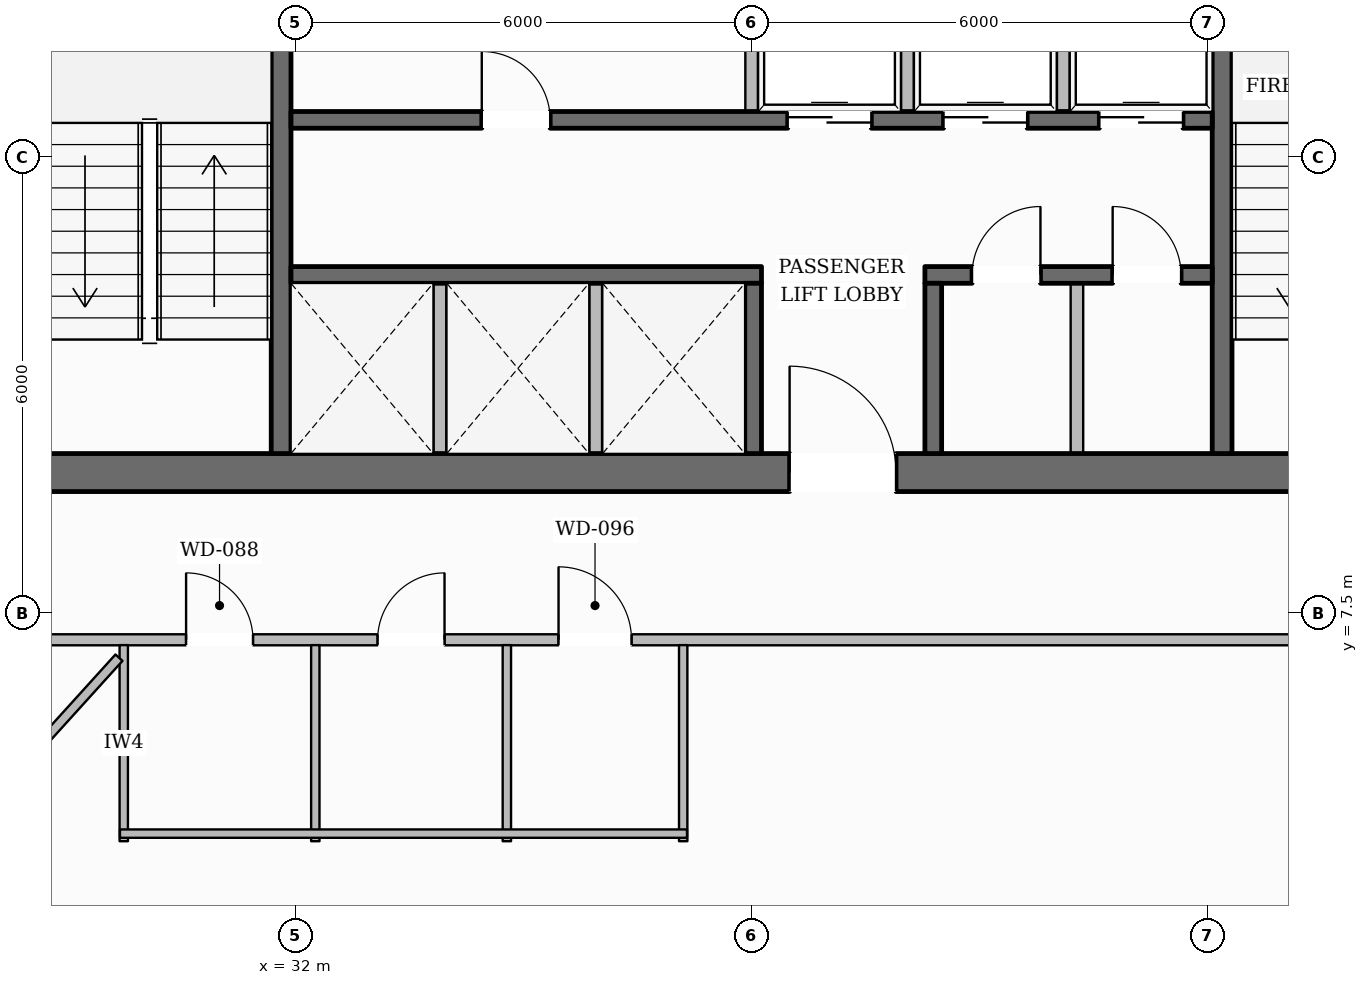
"""IFC4 building model, lengths in metres.
Left out: names, types, materials, properties, quantities, classifications, styles, units other than length and angle.
Written with IfcOpenShell. Run it as: python <this file> out.ifc"""

import sys

from ifc_helpers import new_model, si_unit, direction, frame, frame_2d, origin, place, context, subcontext, project, spatial, rectangle, extrude, element, fill, save


model = new_model("IFC4")
c1 = context("Model", 3, precision=1e-05, world=origin(), true_north=direction((0.0, 1.0)))
c2 = subcontext(c1, "Body", "Model", "MODEL_VIEW")
j1 = project(units=[si_unit("LENGTHUNIT", "METRE"), si_unit("PLANEANGLEUNIT", "RADIAN")], contexts=[c1])
p1 = place(None, origin())
s1 = spatial("IfcSite", under=j1, at=p1, CompositionType="ELEMENT")
p2 = place(p1, origin())
s2 = spatial("IfcBuilding", under=s1, at=p2, CompositionType="ELEMENT")
p3 = place(p2, frame((0.0, 0.0, 127.85)))
s3 = spatial("IfcBuildingStorey", under=s2, at=p3, CompositionType="ELEMENT", Elevation=127.85)
p4 = place(p3, frame((27.98, 9.35, 0.0), z_axis=(0.0, 0.0, 1.0), x_axis=(1.0, 0.0, 0.0)))
e1 = element("IfcWall", 1, at=p4, inside=s3, PredefinedType="SOLIDWALL", context=c2, shape_type="SweptSolid", body=[
    extrude(rectangle(XDim=20.04, YDim=0.5, at=frame_2d((10.02, 0.0))), origin(), (0.0, 0.0, 1.0), 3.6),
])
p5 = place(p4, frame((10.52, 0.0, 0.0)))
e2 = element("IfcOpeningElement", 2, at=p5, cuts=e1, PredefinedType="OPENING", context=c2, shape_type="SweptSolid", body=[
    extrude(rectangle(XDim=1.4, YDim=2.2, at=frame_2d((0.7, 1.1))), frame((0.0, 0.26, 0.0), z_axis=(0.0, -1.0, 0.0), x_axis=(1.0, 0.0, 0.0)), (0.0, 0.0, 1.0), 0.52),
])
p6 = place(p3, frame((31.81, 9.6, 0.0), z_axis=(0.0, 0.0, 1.0), x_axis=(0.0, 1.0, 0.0)))
e3 = element("IfcWall", 3, at=p6, inside=s3, PredefinedType="SHEAR", context=c2, shape_type="SweptSolid", body=[
    extrude(rectangle(XDim=13.0, YDim=0.26, at=frame_2d((6.5, 0.0))), origin(), (0.0, 0.0, 1.0), 3.6),
])
p7 = place(p6, frame((10.925, 0.0, 0.0)))
e4 = element("IfcOpeningElement", 4, at=p7, cuts=e3, PredefinedType="OPENING", context=c2, shape_type="SweptSolid", body=[
    extrude(rectangle(XDim=1.25, YDim=2.25, at=frame_2d((0.625, 1.125))), frame((0.0, 0.14, 0.0), z_axis=(0.0, -1.0, 0.0), x_axis=(1.0, 0.0, 0.0)), (0.0, 0.0, 1.0), 0.28),
])
p8 = place(p3, frame((44.19, 9.6, 0.0), z_axis=(0.0, 0.0, 1.0), x_axis=(0.0, 1.0, 0.0)))
e5 = element("IfcWall", 5, at=p8, inside=s3, PredefinedType="SHEAR", context=c2, shape_type="SweptSolid", body=[
    extrude(rectangle(XDim=13.0, YDim=0.26, at=frame_2d((6.5, 0.0))), origin(), (0.0, 0.0, 1.0), 3.6),
])
p9 = place(p8, frame((10.925, 0.0, 0.0)))
e6 = element("IfcOpeningElement", 6, at=p9, cuts=e5, PredefinedType="OPENING", context=c2, shape_type="SweptSolid", body=[
    extrude(rectangle(XDim=1.25, YDim=2.25, at=frame_2d((0.625, 1.125))), frame((0.0, 0.14, 0.0), z_axis=(0.0, -1.0, 0.0), x_axis=(1.0, 0.0, 0.0)), (0.0, 0.0, 1.0), 0.28),
])
p10 = place(p3, frame((31.94, 13.99, 0.0), z_axis=(0.0, 0.0, 1.0), x_axis=(1.0, 0.0, 0.0)))
e7 = element("IfcWall", 7, at=p10, inside=s3, PredefinedType="SOLIDWALL", context=c2, shape_type="SweptSolid", body=[
    extrude(rectangle(XDim=12.12, YDim=0.22, at=frame_2d((6.06, 0.0))), origin(), (0.0, 0.0, 1.0), 3.6),
])
p11 = place(p10, frame((2.51, 0.0, 0.0)))
e8 = element("IfcOpeningElement", 8, at=p11, cuts=e7, PredefinedType="OPENING", context=c2, shape_type="SweptSolid", body=[
    extrude(rectangle(XDim=0.9, YDim=2.1, at=frame_2d((0.45, 1.05))), frame((0.0, 0.12, 0.0), z_axis=(0.0, -1.0, 0.0), x_axis=(1.0, 0.0, 0.0)), (0.0, 0.0, 1.0), 0.24),
])
p12 = place(p10, frame((6.535, 0.0, 0.0)))
e9 = element("IfcOpeningElement", 9, at=p12, cuts=e7, PredefinedType="OPENING", context=c2, shape_type="SweptSolid", body=[
    extrude(rectangle(XDim=1.1, YDim=2.2, at=frame_2d((0.55, 1.1))), frame((0.0, 0.12, 0.0), z_axis=(0.0, -1.0, 0.0), x_axis=(1.0, 0.0, 0.0)), (0.0, 0.0, 1.0), 0.24),
])
p13 = place(p10, frame((8.585, 0.0, 0.0)))
e10 = element("IfcOpeningElement", 10, at=p13, cuts=e7, PredefinedType="OPENING", context=c2, shape_type="SweptSolid", body=[
    extrude(rectangle(XDim=1.1, YDim=2.2, at=frame_2d((0.55, 1.1))), frame((0.0, 0.12, 0.0), z_axis=(0.0, -1.0, 0.0), x_axis=(1.0, 0.0, 0.0)), (0.0, 0.0, 1.0), 0.24),
])
p14 = place(p10, frame((10.635, 0.0, 0.0)))
e11 = element("IfcOpeningElement", 11, at=p14, cuts=e7, PredefinedType="OPENING", context=c2, shape_type="SweptSolid", body=[
    extrude(rectangle(XDim=1.1, YDim=2.2, at=frame_2d((0.55, 1.1))), frame((0.0, 0.12, 0.0), z_axis=(0.0, -1.0, 0.0), x_axis=(1.0, 0.0, 0.0)), (0.0, 0.0, 1.0), 0.24),
])
p15 = place(p3, frame((31.94, 11.95, 0.0), z_axis=(0.0, 0.0, 1.0), x_axis=(1.0, 0.0, 0.0)))
e12 = element("IfcWall", 12, at=p15, inside=s3, PredefinedType="SOLIDWALL", context=c2, shape_type="SweptSolid", body=[
    extrude(rectangle(XDim=6.19, YDim=0.22, at=frame_2d((3.095, 0.0))), origin(), (0.0, 0.0, 1.0), 3.6),
])
p16 = place(p3, frame((40.28, 11.95, 0.0), z_axis=(0.0, 0.0, 1.0), x_axis=(1.0, 0.0, 0.0)))
e13 = element("IfcWall", 13, at=p16, inside=s3, PredefinedType="SOLIDWALL", context=c2, shape_type="SweptSolid", body=[
    extrude(rectangle(XDim=3.78, YDim=0.22, at=frame_2d((1.89, 0.0))), origin(), (0.0, 0.0, 1.0), 3.6),
])
p17 = place(p16, frame((0.62, 0.0, 0.0)))
e14 = element("IfcOpeningElement", 14, at=p17, cuts=e13, PredefinedType="OPENING", context=c2, shape_type="SweptSolid", body=[
    extrude(rectangle(XDim=0.9, YDim=2.1, at=frame_2d((0.45, 1.05))), frame((0.0, 0.12, 0.0), z_axis=(0.0, -1.0, 0.0), x_axis=(1.0, 0.0, 0.0)), (0.0, 0.0, 1.0), 0.24),
])
p18 = place(p16, frame((2.47, 0.0, 0.0)))
e15 = element("IfcOpeningElement", 15, at=p18, cuts=e13, PredefinedType="OPENING", context=c2, shape_type="SweptSolid", body=[
    extrude(rectangle(XDim=0.9, YDim=2.1, at=frame_2d((0.45, 1.05))), frame((0.0, 0.12, 0.0), z_axis=(0.0, -1.0, 0.0), x_axis=(1.0, 0.0, 0.0)), (0.0, 0.0, 1.0), 0.24),
])
for number, where, z_axis, x_axis in (
    (16, (38.02, 9.6, 0.0), (0.0, 0.0, 1.0), (0.0, 1.0, 0.0)),
    (17, (40.39, 9.6, 0.0), (0.0, 0.0, 1.0), (0.0, 1.0, 0.0)),
):
    element("IfcWall", number, at=place(p3, frame(where, z_axis=z_axis, x_axis=x_axis)), inside=s3, PredefinedType="SOLIDWALL", context=c2, shape_type="SweptSolid", body=[
        extrude(rectangle(XDim=2.24, YDim=0.22, at=frame_2d((1.12, 0.0))), origin(), (0.0, 0.0, 1.0), 3.6),
    ])
p19 = place(p3, frame((13.648, 12.443, 0.0), z_axis=(0.0, 0.0, 1.0), x_axis=(0.504070270963, 0.863662643589, 0.0)))
e18 = element("IfcWall", 18, at=p19, inside=s3, PredefinedType="STANDARD", context=c2, shape_type="SweptSolid", body=[
    extrude(rectangle(XDim=36.948, YDim=0.38, at=frame_2d((18.474, 0.0))), origin(), (0.0, 0.0, 1.0), 3.059),
])
p20 = place(p19, frame((27.111, 0.0, 0.0)))
e19 = element("IfcOpeningElement", 19, at=p20, cuts=e18, PredefinedType="OPENING", context=c2, shape_type="SweptSolid", body=[
    extrude(rectangle(XDim=1.0, YDim=2.2, at=frame_2d((0.5, 1.1))), frame((0.0, 0.2, 0.0), z_axis=(0.0, -1.0, 0.0), x_axis=(1.0, 0.0, 0.0)), (0.0, 0.0, 1.0), 0.4),
])
p21 = place(p19, frame((32.697, 0.0, 0.65)))
e20 = element("IfcOpeningElement", 20, at=p21, cuts=e18, PredefinedType="OPENING", context=c2, shape_type="SweptSolid", body=[
    extrude(rectangle(XDim=1.55, YDim=1.75, at=frame_2d((0.775, 0.875))), frame((0.0, 0.2, 0.0), z_axis=(0.0, -1.0, 0.0), x_axis=(1.0, 0.0, 0.0)), (0.0, 0.0, 1.0), 0.4),
])
p22 = place(p19, frame((20.7, 0.0, 0.65)))
e21 = element("IfcOpeningElement", 21, at=p22, cuts=e18, PredefinedType="OPENING", context=c2, shape_type="SweptSolid", body=[
    extrude(rectangle(XDim=1.55, YDim=1.75, at=frame_2d((0.775, 0.875))), frame((0.0, 0.2, 0.0), z_axis=(0.0, -1.0, 0.0), x_axis=(1.0, 0.0, 0.0)), (0.0, 0.0, 1.0), 0.4),
])
p23 = place(p19, frame((8.704, 0.0, 0.65)))
e22 = element("IfcOpeningElement", 22, at=p23, cuts=e18, PredefinedType="OPENING", context=c2, shape_type="SweptSolid", body=[
    extrude(rectangle(XDim=1.55, YDim=1.75, at=frame_2d((0.775, 0.875))), frame((0.0, 0.2, 0.0), z_axis=(0.0, -1.0, 0.0), x_axis=(1.0, 0.0, 0.0)), (0.0, 0.0, 1.0), 0.4),
])
p24 = place(p19, frame((2.705, 0.0, 0.65)))
e23 = element("IfcOpeningElement", 23, at=p24, cuts=e18, PredefinedType="OPENING", context=c2, shape_type="SweptSolid", body=[
    extrude(rectangle(XDim=1.55, YDim=1.75, at=frame_2d((0.775, 0.875))), frame((0.0, 0.2, 0.0), z_axis=(0.0, -1.0, 0.0), x_axis=(1.0, 0.0, 0.0)), (0.0, 0.0, 1.0), 0.4),
])
p25 = place(p3, frame((43.789, 44.317, 0.0), z_axis=(0.0, 0.0, 1.0), x_axis=(0.506589674511, -0.862187277613, 0.0)))
e24 = element("IfcWall", 24, at=p25, inside=s3, PredefinedType="STANDARD", context=c2, shape_type="SweptSolid", body=[
    extrude(rectangle(XDim=37.135, YDim=0.38, at=frame_2d((18.568, 0.0))), origin(), (0.0, 0.0, 1.0), 3.059),
])
p26 = place(p25, frame((27.252, 0.0, 0.0)))
e25 = element("IfcOpeningElement", 25, at=p26, cuts=e24, PredefinedType="OPENING", context=c2, shape_type="SweptSolid", body=[
    extrude(rectangle(XDim=1.0, YDim=2.2, at=frame_2d((0.5, 1.1))), frame((0.0, 0.2, 0.0), z_axis=(0.0, -1.0, 0.0), x_axis=(1.0, 0.0, 0.0)), (0.0, 0.0, 1.0), 0.4),
])
p27 = place(p25, frame((32.865, 0.0, 0.65)))
e26 = element("IfcOpeningElement", 26, at=p27, cuts=e24, PredefinedType="OPENING", context=c2, shape_type="SweptSolid", body=[
    extrude(rectangle(XDim=1.55, YDim=1.75, at=frame_2d((0.775, 0.875))), frame((0.0, 0.2, 0.0), z_axis=(0.0, -1.0, 0.0), x_axis=(1.0, 0.0, 0.0)), (0.0, 0.0, 1.0), 0.4),
])
p28 = place(p25, frame((20.804, 0.0, 0.65)))
e27 = element("IfcOpeningElement", 27, at=p28, cuts=e24, PredefinedType="OPENING", context=c2, shape_type="SweptSolid", body=[
    extrude(rectangle(XDim=1.55, YDim=1.75, at=frame_2d((0.775, 0.875))), frame((0.0, 0.2, 0.0), z_axis=(0.0, -1.0, 0.0), x_axis=(1.0, 0.0, 0.0)), (0.0, 0.0, 1.0), 0.4),
])
p29 = place(p25, frame((8.744, 0.0, 0.65)))
e28 = element("IfcOpeningElement", 28, at=p29, cuts=e24, PredefinedType="OPENING", context=c2, shape_type="SweptSolid", body=[
    extrude(rectangle(XDim=1.55, YDim=1.75, at=frame_2d((0.775, 0.875))), frame((0.0, 0.2, 0.0), z_axis=(0.0, -1.0, 0.0), x_axis=(1.0, 0.0, 0.0)), (0.0, 0.0, 1.0), 0.4),
])
p30 = place(p25, frame((2.714, 0.0, 0.65)))
e29 = element("IfcOpeningElement", 29, at=p30, cuts=e24, PredefinedType="OPENING", context=c2, shape_type="SweptSolid", body=[
    extrude(rectangle(XDim=1.55, YDim=1.75, at=frame_2d((0.775, 0.875))), frame((0.0, 0.2, 0.0), z_axis=(0.0, -1.0, 0.0), x_axis=(1.0, 0.0, 0.0)), (0.0, 0.0, 1.0), 0.4),
])
for number, where, z_axis, x_axis in (
    (30, (33.9, 9.55, 0.0), (0.0, 0.0, 1.0), (0.0, 1.0, 0.0)),
    (31, (35.95, 9.55, 0.0), (0.0, 0.0, 1.0), (0.0, 1.0, 0.0)),
):
    element("IfcWall", number, at=place(p3, frame(where, z_axis=z_axis, x_axis=x_axis)), inside=s3, PredefinedType="PARTITIONING", context=c2, shape_type="SweptSolid", body=[
        extrude(rectangle(XDim=2.29, YDim=0.165, at=frame_2d((1.145, 0.0))), origin(), (0.0, 0.0, 1.0), 3.6),
    ])
for number, where, z_axis, x_axis in (
    (32, (38.0, 14.1, 0.0), (0.0, 0.0, 1.0), (0.0, 1.0, 0.0)),
    (33, (40.05, 14.1, 0.0), (0.0, 0.0, 1.0), (0.0, 1.0, 0.0)),
    (34, (42.1, 14.1, 0.0), (0.0, 0.0, 1.0), (0.0, 1.0, 0.0)),
):
    element("IfcWall", number, at=place(p3, frame(where, z_axis=z_axis, x_axis=x_axis)), inside=s3, PredefinedType="PARTITIONING", context=c2, shape_type="SweptSolid", body=[
        extrude(rectangle(XDim=2.24, YDim=0.165, at=frame_2d((1.12, 0.0))), origin(), (0.0, 0.0, 1.0), 3.6),
    ])
p31 = place(p3, frame((42.28, 9.55, 0.0), z_axis=(0.0, 0.0, 1.0), x_axis=(0.0, 1.0, 0.0)))
e35 = element("IfcWall", 35, at=p31, inside=s3, PredefinedType="PARTITIONING", context=c2, shape_type="SweptSolid", body=[
    extrude(rectangle(XDim=2.29, YDim=0.165, at=frame_2d((1.145, 0.0))), origin(), (0.0, 0.0, 1.0), 3.6),
])
p32 = place(p3, frame((26.03, 7.15, 0.0), z_axis=(0.0, 0.0, 1.0), x_axis=(1.0, 0.0, 0.0)))
e36 = element("IfcWall", 36, at=p32, inside=s3, PredefinedType="PARTITIONING", context=c2, shape_type="SweptSolid", body=[
    extrude(rectangle(XDim=23.94, YDim=0.145, at=frame_2d((11.97, 0.0))), origin(), (0.0, 0.0, 1.0), 3.6),
])
p33 = place(p32, frame((4.53, 0.0, 0.0)))
e37 = element("IfcOpeningElement", 37, at=p33, cuts=e36, PredefinedType="OPENING", context=c2, shape_type="SweptSolid", body=[
    extrude(rectangle(XDim=0.88, YDim=2.1, at=frame_2d((0.44, 1.05))), frame((0.0, 0.083, 0.0), z_axis=(0.0, -1.0, 0.0), x_axis=(1.0, 0.0, 0.0)), (0.0, 0.0, 1.0), 0.165),
])
p34 = place(p32, frame((7.05, 0.0, 0.0)))
e38 = element("IfcOpeningElement", 38, at=p34, cuts=e36, PredefinedType="OPENING", context=c2, shape_type="SweptSolid", body=[
    extrude(rectangle(XDim=0.88, YDim=2.1, at=frame_2d((0.44, 1.05))), frame((0.0, 0.083, 0.0), z_axis=(0.0, -1.0, 0.0), x_axis=(1.0, 0.0, 0.0)), (0.0, 0.0, 1.0), 0.165),
])
p35 = place(p32, frame((9.43, 0.0, 0.0)))
e39 = element("IfcOpeningElement", 39, at=p35, cuts=e36, PredefinedType="OPENING", context=c2, shape_type="SweptSolid", body=[
    extrude(rectangle(XDim=0.96, YDim=2.1, at=frame_2d((0.48, 1.05))), frame((0.0, 0.083, 0.0), z_axis=(0.0, -1.0, 0.0), x_axis=(1.0, 0.0, 0.0)), (0.0, 0.0, 1.0), 0.165),
])
for number, where, z_axis, x_axis in (
    (40, (29.74, 4.5, 0.0), (0.0, 0.0, 1.0), (0.0, 1.0, 0.0)),
    (41, (32.26, 4.5, 0.0), (0.0, 0.0, 1.0), (0.0, 1.0, 0.0)),
    (42, (34.78, 4.5, 0.0), (0.0, 0.0, 1.0), (0.0, 1.0, 0.0)),
    (43, (37.1, 4.5, 0.0), (0.0, 0.0, 1.0), (0.0, 1.0, 0.0)),
):
    element("IfcWall", number, at=place(p3, frame(where, z_axis=z_axis, x_axis=x_axis)), inside=s3, PredefinedType="PLUMBINGWALL", context=c2, shape_type="SweptSolid", body=[
        extrude(rectangle(XDim=2.58, YDim=0.11, at=frame_2d((1.29, 0.0))), origin(), (0.0, 0.0, 1.0), 3.6),
    ])
p36 = place(p3, frame((29.69, 4.6, 0.0), z_axis=(0.0, 0.0, 1.0), x_axis=(1.0, 0.0, 0.0)))
e44 = element("IfcWall", 44, at=p36, inside=s3, PredefinedType="PLUMBINGWALL", context=c2, shape_type="SweptSolid", body=[
    extrude(rectangle(XDim=7.46, YDim=0.11, at=frame_2d((3.73, 0.0))), origin(), (0.0, 0.0, 1.0), 3.6),
])
p37 = place(p3, frame((29.677, 6.915, 0.0), z_axis=(0.0, 0.0, 1.0), x_axis=(-0.671453924144, -0.741046306078, 0.0)))
e45 = element("IfcWall", 45, at=p37, inside=s3, PredefinedType="PARTITIONING", context=c2, shape_type="SweptSolid", body=[
    extrude(rectangle(XDim=4.989, YDim=0.125, at=frame_2d((2.494, 0.0))), origin(), (0.0, 0.0, 1.0), 3.6),
])
p38 = place(p5, origin())
e46 = element("IfcDoor", 46, at=p38, inside=s3, OperationType="SINGLE_SWING_LEFT", PredefinedType="DOOR", context=c2, shape_type="SweptSolid", body=[
    extrude(rectangle(XDim=1.4, YDim=2.2, at=frame_2d((0.7, 1.1))), frame((0.0, 0.025, 0.0), z_axis=(0.0, -1.0, 0.0), x_axis=(1.0, 0.0, 0.0)), (0.0, 0.0, 1.0), 0.05),
])
fill(e2, e46)
p39 = place(p11, origin())
e47 = element("IfcDoor", 47, at=p39, inside=s3, OperationType="SINGLE_SWING_LEFT", PredefinedType="DOOR", context=c2, shape_type="SweptSolid", body=[
    extrude(rectangle(XDim=0.9, YDim=2.1, at=frame_2d((0.45, 1.05))), frame((0.0, 0.025, 0.0), z_axis=(0.0, -1.0, 0.0), x_axis=(1.0, 0.0, 0.0)), (0.0, 0.0, 1.0), 0.05),
])
fill(e8, e47)
p40 = place(p12, origin())
e48 = element("IfcDoor", 48, at=p40, inside=s3, OperationType="DOUBLE_DOOR_SLIDING", PredefinedType="DOOR", context=c2, shape_type="SweptSolid", body=[
    extrude(rectangle(XDim=1.1, YDim=2.2, at=frame_2d((0.55, 1.1))), frame((0.0, 0.025, 0.0), z_axis=(0.0, -1.0, 0.0), x_axis=(1.0, 0.0, 0.0)), (0.0, 0.0, 1.0), 0.05),
])
fill(e9, e48)
p41 = place(p13, origin())
e49 = element("IfcDoor", 49, at=p41, inside=s3, OperationType="DOUBLE_DOOR_SLIDING", PredefinedType="DOOR", context=c2, shape_type="SweptSolid", body=[
    extrude(rectangle(XDim=1.1, YDim=2.2, at=frame_2d((0.55, 1.1))), frame((0.0, 0.025, 0.0), z_axis=(0.0, -1.0, 0.0), x_axis=(1.0, 0.0, 0.0)), (0.0, 0.0, 1.0), 0.05),
])
fill(e10, e49)
p42 = place(p14, origin())
e50 = element("IfcDoor", 50, at=p42, inside=s3, OperationType="DOUBLE_DOOR_SLIDING", PredefinedType="DOOR", context=c2, shape_type="SweptSolid", body=[
    extrude(rectangle(XDim=1.1, YDim=2.2, at=frame_2d((0.55, 1.1))), frame((0.0, 0.025, 0.0), z_axis=(0.0, -1.0, 0.0), x_axis=(1.0, 0.0, 0.0)), (0.0, 0.0, 1.0), 0.05),
])
fill(e11, e50)
p43 = place(p17, origin())
e51 = element("IfcDoor", 51, at=p43, inside=s3, OperationType="SINGLE_SWING_RIGHT", PredefinedType="DOOR", context=c2, shape_type="SweptSolid", body=[
    extrude(rectangle(XDim=0.9, YDim=2.1, at=frame_2d((0.45, 1.05))), frame((0.0, 0.025, 0.0), z_axis=(0.0, -1.0, 0.0), x_axis=(1.0, 0.0, 0.0)), (0.0, 0.0, 1.0), 0.05),
])
fill(e14, e51)
p44 = place(p18, origin())
e52 = element("IfcDoor", 52, at=p44, inside=s3, OperationType="SINGLE_SWING_LEFT", PredefinedType="DOOR", context=c2, shape_type="SweptSolid", body=[
    extrude(rectangle(XDim=0.9, YDim=2.1, at=frame_2d((0.45, 1.05))), frame((0.0, 0.025, 0.0), z_axis=(0.0, -1.0, 0.0), x_axis=(1.0, 0.0, 0.0)), (0.0, 0.0, 1.0), 0.05),
])
fill(e15, e52)
p45 = place(p33, origin())
e53 = element("IfcDoor", 53, at=p45, inside=s3, OperationType="SINGLE_SWING_LEFT", PredefinedType="DOOR", context=c2, shape_type="SweptSolid", body=[
    extrude(rectangle(XDim=0.88, YDim=2.1, at=frame_2d((0.44, 1.05))), frame((0.0, 0.025, 0.0), z_axis=(0.0, -1.0, 0.0), x_axis=(1.0, 0.0, 0.0)), (0.0, 0.0, 1.0), 0.05),
])
fill(e37, e53)
p46 = place(p34, origin())
e54 = element("IfcDoor", 54, at=p46, inside=s3, OperationType="SINGLE_SWING_RIGHT", PredefinedType="DOOR", context=c2, shape_type="SweptSolid", body=[
    extrude(rectangle(XDim=0.88, YDim=2.1, at=frame_2d((0.44, 1.05))), frame((0.0, 0.025, 0.0), z_axis=(0.0, -1.0, 0.0), x_axis=(1.0, 0.0, 0.0)), (0.0, 0.0, 1.0), 0.05),
])
fill(e38, e54)
p47 = place(p35, origin())
e55 = element("IfcDoor", 55, at=p47, inside=s3, OperationType="SINGLE_SWING_LEFT", PredefinedType="DOOR", context=c2, shape_type="SweptSolid", body=[
    extrude(rectangle(XDim=0.96, YDim=2.1, at=frame_2d((0.48, 1.05))), frame((0.0, 0.025, 0.0), z_axis=(0.0, -1.0, 0.0), x_axis=(1.0, 0.0, 0.0)), (0.0, 0.0, 1.0), 0.05),
])
fill(e39, e55)
save(model, sys.argv[1])
